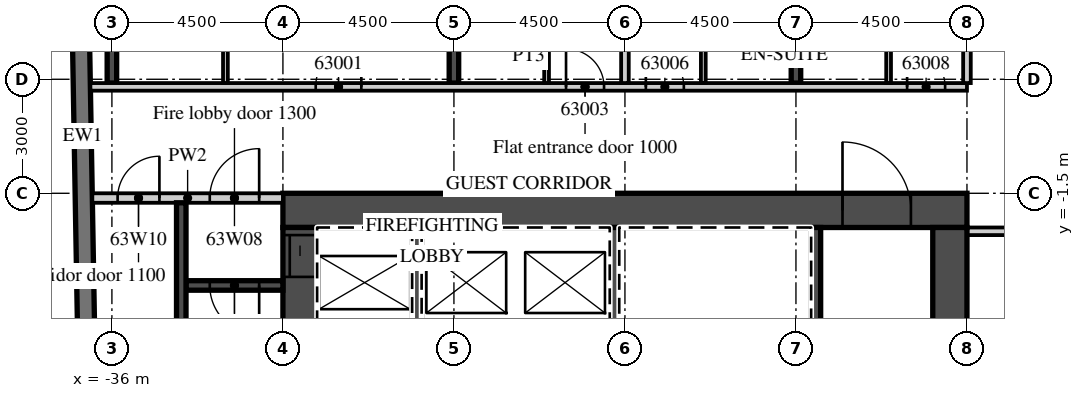
"""IFC4 building model, lengths in metres.
Left out: names, types, materials, properties, quantities, classifications, styles, units other than length and angle.
Written with IfcOpenShell. Run it as: python <this file> out.ifc"""

import sys

from ifc_helpers import new_model, si_unit, direction, frame, frame_2d, origin, place, context, subcontext, project, spatial, rectangle, extrude, element, fill, save


model = new_model("IFC4")
c1 = context("Model", 3, precision=1e-05, world=origin(), true_north=direction((0.0, 1.0)))
c2 = subcontext(c1, "Body", "Model", "MODEL_VIEW")
j1 = project(units=[si_unit("LENGTHUNIT", "METRE"), si_unit("PLANEANGLEUNIT", "RADIAN")], contexts=[c1])
p1 = place(None, origin())
s1 = spatial("IfcSite", under=j1, at=p1, CompositionType="ELEMENT")
p2 = place(p1, origin())
s2 = spatial("IfcBuilding", under=s1, at=p2, CompositionType="ELEMENT")
p3 = place(p2, frame((0.0, 0.0, 254.0)))
s3 = spatial("IfcBuildingStorey", under=s2, at=p3, CompositionType="ELEMENT", Elevation=254.0)
p4 = place(p3, frame((-36.0, 1.4, 0.0), z_axis=(0.0, 0.0, 1.0), x_axis=(0.0, 1.0, 0.0)))
e1 = element("IfcWall", 1, at=p4, inside=s3, PredefinedType="SHEAR", context=c2, shape_type="SweptSolid", body=[
    extrude(rectangle(XDim=17.125, YDim=0.25, at=frame_2d((8.563, 0.0))), origin(), (0.0, 0.0, 1.0), 3.0),
])
p5 = place(p3, frame((-27.0, 1.4, 0.0), z_axis=(0.0, 0.0, 1.0), x_axis=(0.0, 1.0, 0.0)))
e2 = element("IfcWall", 2, at=p5, inside=s3, PredefinedType="SHEAR", context=c2, shape_type="SweptSolid", body=[
    extrude(rectangle(XDim=18.817, YDim=0.25, at=frame_2d((9.409, 0.0))), origin(), (0.0, 0.0, 1.0), 3.0),
])
p6 = place(p3, frame((-18.0, 1.4, 0.0), z_axis=(0.0, 0.0, 1.0), x_axis=(0.0, 1.0, 0.0)))
e3 = element("IfcWall", 3, at=p6, inside=s3, PredefinedType="SHEAR", context=c2, shape_type="SweptSolid", body=[
    extrude(rectangle(XDim=18.974, YDim=0.25, at=frame_2d((9.487, 0.0))), origin(), (0.0, 0.0, 1.0), 3.0),
])
p7 = place(p3, frame((-37.057, 16.503, 0.0), z_axis=(0.0, 0.0, 1.0), x_axis=(0.017452279857, -0.999847697366, 0.0)))
e4 = element("IfcWall", 4, at=p7, inside=s3, PredefinedType="SOLIDWALL", context=c2, shape_type="SweptSolid", body=[
    extrude(rectangle(XDim=33.0, YDim=0.45, at=frame_2d((16.5, 0.0))), origin(), (0.0, 0.0, 1.0), 3.0),
])
p8 = place(p3, frame((-36.566, 1.3, 0.0), z_axis=(0.0, 0.0, 1.0), x_axis=(1.0, 0.0, 0.0)))
e5 = element("IfcWall", 5, at=p8, inside=s3, PredefinedType="PARTITIONING", context=c2, shape_type="SweptSolid", body=[
    extrude(rectangle(XDim=23.066, YDim=0.2, at=frame_2d((11.533, 0.0))), origin(), (0.0, 0.0, 1.0), 3.0),
])
p9 = place(p8, frame((5.929, 0.0, 0.0)))
e6 = element("IfcOpeningElement", 6, at=p9, cuts=e5, PredefinedType="OPENING", context=c2, shape_type="SweptSolid", body=[
    extrude(rectangle(XDim=1.2, YDim=2.1, at=frame_2d((0.6, 1.05))), frame((0.0, 0.11, 0.0), z_axis=(0.0, -1.0, 0.0), x_axis=(1.0, 0.0, 0.0)), (0.0, 0.0, 1.0), 0.22),
])
p10 = place(p8, frame((12.516, 0.0, 0.0)))
e7 = element("IfcOpeningElement", 7, at=p10, cuts=e5, PredefinedType="OPENING", context=c2, shape_type="SweptSolid", body=[
    extrude(rectangle(XDim=1.0, YDim=2.1, at=frame_2d((0.5, 1.05))), frame((0.0, 0.11, 0.0), z_axis=(0.0, -1.0, 0.0), x_axis=(1.0, 0.0, 0.0)), (0.0, 0.0, 1.0), 0.22),
])
p11 = place(p8, frame((14.616, 0.0, 0.0)))
e8 = element("IfcOpeningElement", 8, at=p11, cuts=e5, PredefinedType="OPENING", context=c2, shape_type="SweptSolid", body=[
    extrude(rectangle(XDim=1.0, YDim=2.1, at=frame_2d((0.5, 1.05))), frame((0.0, 0.11, 0.0), z_axis=(0.0, -1.0, 0.0), x_axis=(1.0, 0.0, 0.0)), (0.0, 0.0, 1.0), 0.22),
])
p12 = place(p8, frame((21.491, 0.0, 0.0)))
e9 = element("IfcOpeningElement", 9, at=p12, cuts=e5, PredefinedType="OPENING", context=c2, shape_type="SweptSolid", body=[
    extrude(rectangle(XDim=1.0, YDim=2.1, at=frame_2d((0.5, 1.05))), frame((0.0, 0.11, 0.0), z_axis=(0.0, -1.0, 0.0), x_axis=(1.0, 0.0, 0.0)), (0.0, 0.0, 1.0), 0.22),
])
p13 = place(p3, frame((-33.013, 1.4, 0.0), z_axis=(0.0, 0.0, 1.0), x_axis=(0.0, 1.0, 0.0)))
e10 = element("IfcWall", 10, at=p13, inside=s3, PredefinedType="PARTITIONING", context=c2, shape_type="SweptSolid", body=[
    extrude(rectangle(XDim=4.725, YDim=0.125, at=frame_2d((2.363, 0.0))), origin(), (0.0, 0.0, 1.0), 3.0),
])
p14 = place(p13, frame((2.45, 0.0, 0.0)))
e11 = element("IfcOpeningElement", 11, at=p14, cuts=e10, PredefinedType="OPENING", context=c2, shape_type="SweptSolid", body=[
    extrude(rectangle(XDim=0.9, YDim=2.1, at=frame_2d((0.45, 1.05))), frame((0.0, 0.073, 0.0), z_axis=(0.0, -1.0, 0.0), x_axis=(1.0, 0.0, 0.0)), (0.0, 0.0, 1.0), 0.145),
])
p15 = place(p3, frame((-22.5, 1.4, 0.0), z_axis=(0.0, 0.0, 1.0), x_axis=(0.0, 1.0, 0.0)))
e12 = element("IfcWall", 12, at=p15, inside=s3, PredefinedType="PARTITIONING", context=c2, shape_type="SweptSolid", body=[
    extrude(rectangle(XDim=18.908, YDim=0.2, at=frame_2d((9.454, 0.0))), origin(), (0.0, 0.0, 1.0), 3.0),
])
p16 = place(p3, frame((-24.562, 1.4, 0.0), z_axis=(0.0, 0.0, 1.0), x_axis=(0.0, 1.0, 0.0)))
e13 = element("IfcWall", 13, at=p16, inside=s3, PredefinedType="PARTITIONING", context=c2, shape_type="SweptSolid", body=[
    extrude(rectangle(XDim=4.725, YDim=0.125, at=frame_2d((2.363, 0.0))), origin(), (0.0, 0.0, 1.0), 3.0),
])
p17 = place(p16, frame((2.45, 0.0, 0.0)))
e14 = element("IfcOpeningElement", 14, at=p17, cuts=e13, PredefinedType="OPENING", context=c2, shape_type="SweptSolid", body=[
    extrude(rectangle(XDim=0.9, YDim=2.1, at=frame_2d((0.45, 1.05))), frame((0.0, 0.073, 0.0), z_axis=(0.0, -1.0, 0.0), x_axis=(1.0, 0.0, 0.0)), (0.0, 0.0, 1.0), 0.145),
])
p18 = place(p3, frame((-20.438, 1.4, 0.0), z_axis=(0.0, 0.0, 1.0), x_axis=(0.0, 1.0, 0.0)))
e15 = element("IfcWall", 15, at=p18, inside=s3, PredefinedType="PARTITIONING", context=c2, shape_type="SweptSolid", body=[
    extrude(rectangle(XDim=4.725, YDim=0.125, at=frame_2d((2.363, 0.0))), origin(), (0.0, 0.0, 1.0), 3.0),
])
p19 = place(p18, frame((2.45, 0.0, 0.0)))
e16 = element("IfcOpeningElement", 16, at=p19, cuts=e15, PredefinedType="OPENING", context=c2, shape_type="SweptSolid", body=[
    extrude(rectangle(XDim=0.9, YDim=2.1, at=frame_2d((0.45, 1.05))), frame((0.0, 0.073, 0.0), z_axis=(0.0, -1.0, 0.0), x_axis=(1.0, 0.0, 0.0)), (0.0, 0.0, 1.0), 0.145),
])
p20 = place(p3, frame((-13.5, 1.4, 0.0), z_axis=(0.0, 0.0, 1.0), x_axis=(0.0, 1.0, 0.0)))
e17 = element("IfcWall", 17, at=p20, inside=s3, PredefinedType="PARTITIONING", context=c2, shape_type="SweptSolid", body=[
    extrude(rectangle(XDim=19.065, YDim=0.2, at=frame_2d((9.533, 0.0))), origin(), (0.0, 0.0, 1.0), 3.0),
])
p21 = place(p3, frame((-15.562, 1.4, 0.0), z_axis=(0.0, 0.0, 1.0), x_axis=(0.0, 1.0, 0.0)))
e18 = element("IfcWall", 18, at=p21, inside=s3, PredefinedType="PARTITIONING", context=c2, shape_type="SweptSolid", body=[
    extrude(rectangle(XDim=4.725, YDim=0.125, at=frame_2d((2.363, 0.0))), origin(), (0.0, 0.0, 1.0), 3.0),
])
p22 = place(p21, frame((2.45, 0.0, 0.0)))
e19 = element("IfcOpeningElement", 19, at=p22, cuts=e18, PredefinedType="OPENING", context=c2, shape_type="SweptSolid", body=[
    extrude(rectangle(XDim=0.9, YDim=2.1, at=frame_2d((0.45, 1.05))), frame((0.0, 0.073, 0.0), z_axis=(0.0, -1.0, 0.0), x_axis=(1.0, 0.0, 0.0)), (0.0, 0.0, 1.0), 0.145),
])
p23 = place(p3, frame((-13.5, -2.5, 0.0), z_axis=(0.0, 0.0, 1.0), x_axis=(1.0, 0.0, 0.0)))
e20 = element("IfcWall", 20, at=p23, inside=s3, PredefinedType="PARTITIONING", context=c2, shape_type="SweptSolid", body=[
    extrude(rectangle(XDim=27.0, YDim=0.2, at=frame_2d((13.5, 0.0))), origin(), (0.0, 0.0, 1.0), 3.0),
])
p24 = place(p23, frame((2.925, 0.0, 0.0)))
e21 = element("IfcOpeningElement", 21, at=p24, cuts=e20, PredefinedType="OPENING", context=c2, shape_type="SweptSolid", body=[
    extrude(rectangle(XDim=1.0, YDim=2.1, at=frame_2d((0.5, 1.05))), frame((0.0, 0.11, 0.0), z_axis=(0.0, -1.0, 0.0), x_axis=(1.0, 0.0, 0.0)), (0.0, 0.0, 1.0), 0.22),
])
p25 = place(p23, frame((6.938, 0.0, 0.0)))
e22 = element("IfcOpeningElement", 22, at=p25, cuts=e20, PredefinedType="OPENING", context=c2, shape_type="SweptSolid", body=[
    extrude(rectangle(XDim=1.2, YDim=2.1, at=frame_2d((0.6, 1.05))), frame((0.0, 0.11, 0.0), z_axis=(0.0, -1.0, 0.0), x_axis=(1.0, 0.0, 0.0)), (0.0, 0.0, 1.0), 0.22),
])
p26 = place(p23, frame((18.862, 0.0, 0.0)))
e23 = element("IfcOpeningElement", 23, at=p26, cuts=e20, PredefinedType="OPENING", context=c2, shape_type="SweptSolid", body=[
    extrude(rectangle(XDim=1.2, YDim=2.1, at=frame_2d((0.6, 1.05))), frame((0.0, 0.11, 0.0), z_axis=(0.0, -1.0, 0.0), x_axis=(1.0, 0.0, 0.0)), (0.0, 0.0, 1.0), 0.22),
])
p27 = place(p23, frame((23.075, 0.0, 0.0)))
e24 = element("IfcOpeningElement", 24, at=p27, cuts=e20, PredefinedType="OPENING", context=c2, shape_type="SweptSolid", body=[
    extrude(rectangle(XDim=1.0, YDim=2.1, at=frame_2d((0.5, 1.05))), frame((0.0, 0.11, 0.0), z_axis=(0.0, -1.0, 0.0), x_axis=(1.0, 0.0, 0.0)), (0.0, 0.0, 1.0), 0.22),
])
p28 = place(p3, frame((-31.5, -1.95, 0.0), z_axis=(0.0, 0.0, 1.0), x_axis=(1.0, 0.0, 0.0)))
e25 = element("IfcWall", 25, at=p28, inside=s3, PredefinedType="SHEAR", context=c2, shape_type="SweptSolid", body=[
    extrude(rectangle(XDim=18.0, YDim=0.9, at=frame_2d((9.0, 0.0))), origin(), (0.0, 0.0, 1.0), 3.0),
])
p29 = place(p28, frame((14.725, 0.0, 0.0)))
e26 = element("IfcOpeningElement", 26, at=p29, cuts=e25, PredefinedType="OPENING", context=c2, shape_type="SweptSolid", body=[
    extrude(rectangle(XDim=1.8, YDim=2.1, at=frame_2d((0.9, 1.05))), frame((0.0, 0.46, 0.0), z_axis=(0.0, -1.0, 0.0), x_axis=(1.0, 0.0, 0.0)), (0.0, 0.0, 1.0), 0.92),
])
p30 = place(p3, frame((-31.05, -15.2, 0.0), z_axis=(0.0, 0.0, 1.0), x_axis=(0.0, 1.0, 0.0)))
e27 = element("IfcWall", 27, at=p30, inside=s3, PredefinedType="SHEAR", context=c2, shape_type="SweptSolid", body=[
    extrude(rectangle(XDim=12.8, YDim=0.9, at=frame_2d((6.4, 0.0))), origin(), (0.0, 0.0, 1.0), 3.0),
])
p31 = place(p30, frame((11.5, 0.0, 0.0)))
e28 = element("IfcOpeningElement", 28, at=p31, cuts=e27, PredefinedType="OPENING", context=c2, shape_type="SweptSolid", body=[
    extrude(rectangle(XDim=1.1, YDim=2.1, at=frame_2d((0.55, 1.05))), frame((0.0, 0.46, 0.0), z_axis=(0.0, -1.0, 0.0), x_axis=(1.0, 0.0, 0.0)), (0.0, 0.0, 1.0), 0.92),
])
p32 = place(p3, frame((-13.95, -14.6, 0.0), z_axis=(0.0, 0.0, 1.0), x_axis=(0.0, 1.0, 0.0)))
e29 = element("IfcWall", 29, at=p32, inside=s3, PredefinedType="SHEAR", context=c2, shape_type="SweptSolid", body=[
    extrude(rectangle(XDim=12.2, YDim=0.9, at=frame_2d((6.1, 0.0))), origin(), (0.0, 0.0, 1.0), 3.0),
])
p33 = place(p3, frame((-17.475, -5.55, 0.0), z_axis=(0.0, 0.0, 1.0), x_axis=(0.0, 1.0, 0.0)))
e30 = element("IfcWall", 30, at=p33, inside=s3, PredefinedType="SHEAR", context=c2, shape_type="SweptSolid", body=[
    extrude(rectangle(XDim=3.15, YDim=0.25, at=frame_2d((1.575, 0.0))), origin(), (0.0, 0.0, 1.0), 3.0),
])
for number, where, z_axis, x_axis in (
    (31, (-27.975, -5.3, 0.0), (0.0, 0.0, 1.0), (0.0, 1.0, 0.0)),
    (32, (-22.775, -5.3, 0.0), (0.0, 0.0, 1.0), (0.0, 1.0, 0.0)),
):
    element("IfcWall", number, at=place(p3, frame(where, z_axis=z_axis, x_axis=x_axis)), inside=s3, PredefinedType="SHEAR", context=c2, shape_type="SweptSolid", body=[
        extrude(rectangle(XDim=2.9, YDim=0.25, at=frame_2d((1.45, 0.0))), origin(), (0.0, 0.0, 1.0), 3.0),
    ])
p34 = place(p3, frame((-36.515, -1.625, 0.0), z_axis=(0.0, 0.0, 1.0), x_axis=(1.0, 0.0, 0.0)))
e33 = element("IfcWall", 33, at=p34, inside=s3, PredefinedType="PARTITIONING", context=c2, shape_type="SweptSolid", body=[
    extrude(rectangle(XDim=5.015, YDim=0.25, at=frame_2d((2.508, 0.0))), origin(), (0.0, 0.0, 1.0), 3.0),
])
p35 = place(p34, frame((3.09, 0.0, 0.0)))
e34 = element("IfcOpeningElement", 34, at=p35, cuts=e33, PredefinedType="OPENING", context=c2, shape_type="SweptSolid", body=[
    extrude(rectangle(XDim=1.3, YDim=2.1, at=frame_2d((0.65, 1.05))), frame((0.0, 0.135, 0.0), z_axis=(0.0, -1.0, 0.0), x_axis=(1.0, 0.0, 0.0)), (0.0, 0.0, 1.0), 0.27),
])
p36 = place(p34, frame((0.665, 0.0, 0.0)))
e35 = element("IfcOpeningElement", 35, at=p36, cuts=e33, PredefinedType="OPENING", context=c2, shape_type="SweptSolid", body=[
    extrude(rectangle(XDim=1.1, YDim=2.1, at=frame_2d((0.55, 1.05))), frame((0.0, 0.135, 0.0), z_axis=(0.0, -1.0, 0.0), x_axis=(1.0, 0.0, 0.0)), (0.0, 0.0, 1.0), 0.27),
])
p37 = place(p3, frame((-34.05, -3.925, 0.0), z_axis=(0.0, 0.0, 1.0), x_axis=(1.0, 0.0, 0.0)))
e36 = element("IfcWall", 36, at=p37, inside=s3, PredefinedType="SHEAR", context=c2, shape_type="SweptSolid", body=[
    extrude(rectangle(XDim=2.55, YDim=0.25, at=frame_2d((1.275, 0.0))), origin(), (0.0, 0.0, 1.0), 3.0),
])
p38 = place(p37, frame((0.625, 0.0, 0.0)))
e37 = element("IfcOpeningElement", 37, at=p38, cuts=e36, PredefinedType="OPENING", context=c2, shape_type="SweptSolid", body=[
    extrude(rectangle(XDim=1.3, YDim=2.1, at=frame_2d((0.65, 1.05))), frame((0.0, 0.135, 0.0), z_axis=(0.0, -1.0, 0.0), x_axis=(1.0, 0.0, 0.0)), (0.0, 0.0, 1.0), 0.27),
])
p39 = place(p3, frame((-34.175, -10.1, 0.0), z_axis=(0.0, 0.0, 1.0), x_axis=(0.0, 1.0, 0.0)))
e38 = element("IfcWall", 38, at=p39, inside=s3, PredefinedType="SHEAR", context=c2, shape_type="SweptSolid", body=[
    extrude(rectangle(XDim=8.35, YDim=0.25, at=frame_2d((4.175, 0.0))), origin(), (0.0, 0.0, 1.0), 3.0),
])
p40 = place(p9, origin())
e39 = element("IfcDoor", 39, at=p40, inside=s3, OperationType="SINGLE_SWING_RIGHT", PredefinedType="DOOR", context=c2, shape_type="SweptSolid", body=[
    extrude(rectangle(XDim=1.2, YDim=2.1, at=frame_2d((0.6, 1.05))), frame((0.0, 0.025, 0.0), z_axis=(0.0, -1.0, 0.0), x_axis=(1.0, 0.0, 0.0)), (0.0, 0.0, 1.0), 0.05),
])
fill(e6, e39)
p41 = place(p10, origin())
e40 = element("IfcDoor", 40, at=p41, inside=s3, OperationType="SINGLE_SWING_LEFT", PredefinedType="DOOR", context=c2, shape_type="SweptSolid", body=[
    extrude(rectangle(XDim=1.0, YDim=2.1, at=frame_2d((0.5, 1.05))), frame((0.0, 0.025, 0.0), z_axis=(0.0, -1.0, 0.0), x_axis=(1.0, 0.0, 0.0)), (0.0, 0.0, 1.0), 0.05),
])
fill(e7, e40)
p42 = place(p11, origin())
e41 = element("IfcDoor", 41, at=p42, inside=s3, OperationType="SINGLE_SWING_LEFT", PredefinedType="DOOR", context=c2, shape_type="SweptSolid", body=[
    extrude(rectangle(XDim=1.0, YDim=2.1, at=frame_2d((0.5, 1.05))), frame((0.0, 0.025, 0.0), z_axis=(0.0, -1.0, 0.0), x_axis=(1.0, 0.0, 0.0)), (0.0, 0.0, 1.0), 0.05),
])
fill(e8, e41)
p43 = place(p12, origin())
e42 = element("IfcDoor", 42, at=p43, inside=s3, OperationType="SINGLE_SWING_LEFT", PredefinedType="DOOR", context=c2, shape_type="SweptSolid", body=[
    extrude(rectangle(XDim=1.0, YDim=2.1, at=frame_2d((0.5, 1.05))), frame((0.0, 0.025, 0.0), z_axis=(0.0, -1.0, 0.0), x_axis=(1.0, 0.0, 0.0)), (0.0, 0.0, 1.0), 0.05),
])
fill(e9, e42)
p44 = place(p31, origin())
e43 = element("IfcDoor", 43, at=p44, inside=s3, OperationType="SLIDING_TO_RIGHT", PredefinedType="DOOR", context=c2, shape_type="SweptSolid", body=[
    extrude(rectangle(XDim=1.1, YDim=2.1, at=frame_2d((0.55, 1.05))), frame((0.0, 0.025, 0.0), z_axis=(0.0, -1.0, 0.0), x_axis=(1.0, 0.0, 0.0)), (0.0, 0.0, 1.0), 0.05),
])
fill(e28, e43)
p45 = place(p29, origin())
e44 = element("IfcDoor", 44, at=p45, inside=s3, OperationType="DOUBLE_DOOR_DOUBLE_SWING", PredefinedType="DOOR", context=c2, shape_type="SweptSolid", body=[
    extrude(rectangle(XDim=1.8, YDim=2.1, at=frame_2d((0.9, 1.05))), frame((0.0, 0.025, 0.0), z_axis=(0.0, -1.0, 0.0), x_axis=(1.0, 0.0, 0.0)), (0.0, 0.0, 1.0), 0.05),
])
fill(e26, e44)
p46 = place(p35, origin())
e45 = element("IfcDoor", 45, at=p46, inside=s3, OperationType="SINGLE_SWING_RIGHT", PredefinedType="DOOR", context=c2, shape_type="SweptSolid", body=[
    extrude(rectangle(XDim=1.3, YDim=2.1, at=frame_2d((0.65, 1.05))), frame((0.0, 0.025, 0.0), z_axis=(0.0, -1.0, 0.0), x_axis=(1.0, 0.0, 0.0)), (0.0, 0.0, 1.0), 0.05),
])
fill(e34, e45)
p47 = place(p38, origin())
e46 = element("IfcDoor", 46, at=p47, inside=s3, OperationType="SINGLE_SWING_RIGHT", PredefinedType="DOOR", context=c2, shape_type="SweptSolid", body=[
    extrude(rectangle(XDim=1.3, YDim=2.1, at=frame_2d((0.65, 1.05))), frame((0.0, 0.025, 0.0), z_axis=(0.0, -1.0, 0.0), x_axis=(1.0, 0.0, 0.0)), (0.0, 0.0, 1.0), 0.05),
])
fill(e37, e46)
p48 = place(p36, origin())
e47 = element("IfcDoor", 47, at=p48, inside=s3, OperationType="SINGLE_SWING_RIGHT", PredefinedType="DOOR", context=c2, shape_type="SweptSolid", body=[
    extrude(rectangle(XDim=1.1, YDim=2.1, at=frame_2d((0.55, 1.05))), frame((0.0, 0.025, 0.0), z_axis=(0.0, -1.0, 0.0), x_axis=(1.0, 0.0, 0.0)), (0.0, 0.0, 1.0), 0.05),
])
fill(e35, e47)
save(model, sys.argv[1])
